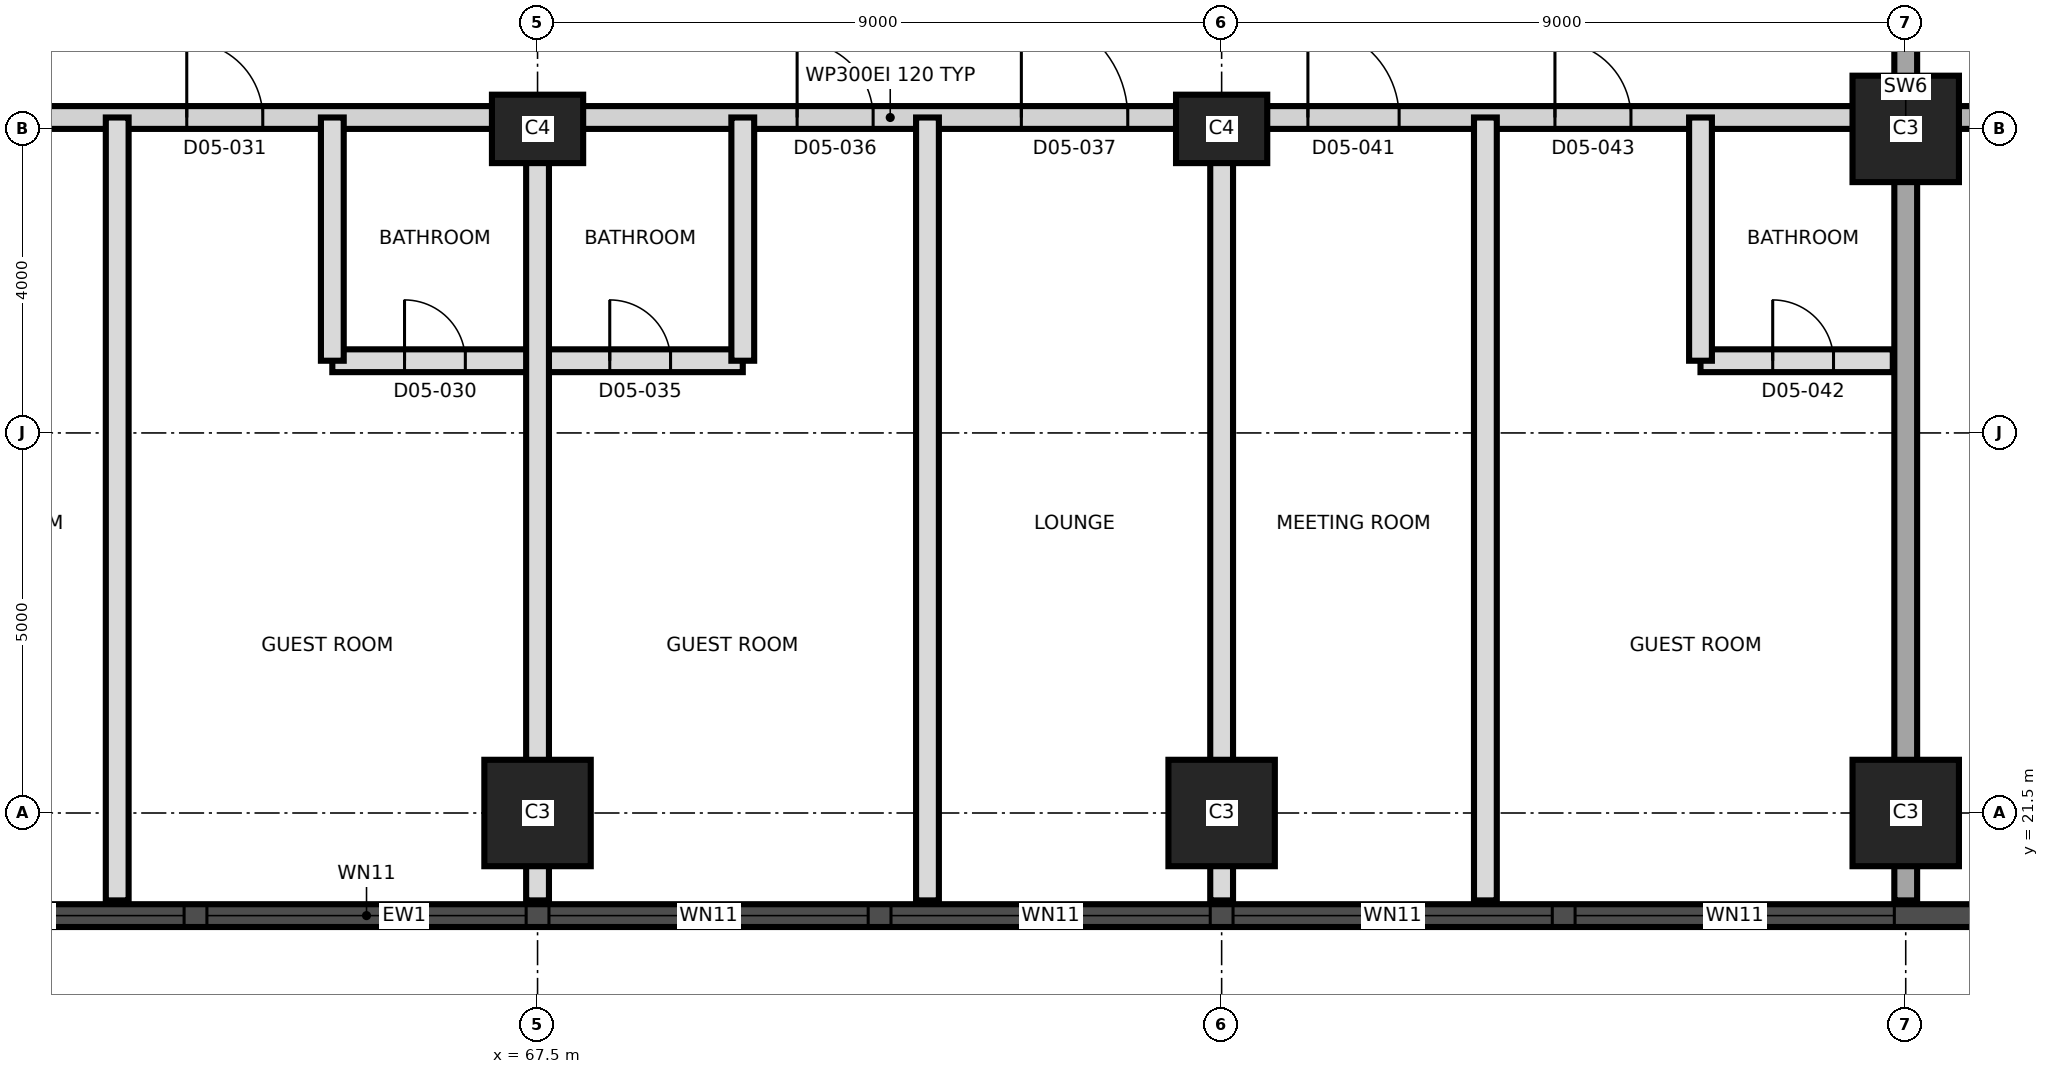
"""IFC4 building model, lengths in metres.
Left out: names, types, materials, properties, quantities, classifications, styles, units other than length and angle.
Written with IfcOpenShell. Run it as: python <this file> out.ifc"""

import sys

from ifc_helpers import new_model, si_unit, direction, frame, frame_2d, origin, origin_2d, place, context, subcontext, project, spatial, rectangle, extrude, element, fill, save


model = new_model("IFC4")
c1 = context("Model", 3, precision=1e-05, world=origin(), true_north=direction((0.0, 1.0)))
c2 = subcontext(c1, "Body", "Model", "MODEL_VIEW")
j1 = project(units=[si_unit("LENGTHUNIT", "METRE"), si_unit("PLANEANGLEUNIT", "RADIAN")], contexts=[c1])
p1 = place(None, origin())
s1 = spatial("IfcSite", under=j1, at=p1, CompositionType="ELEMENT")
p2 = place(p1, origin())
s2 = spatial("IfcBuilding", under=s1, at=p2, CompositionType="ELEMENT")
p3 = place(p2, frame((0.0, 0.0, 74.2)))
s3 = spatial("IfcBuildingStorey", under=s2, at=p3, CompositionType="ELEMENT", Elevation=74.2)
for number, where, z_axis, x_axis in (
    (1, (67.5, 21.5, 0.0), (0.0, 0.0, 1.0), (1.0, 0.0, 0.0)),
    (2, (76.5, 21.5, 0.0), (0.0, 0.0, 1.0), (1.0, 0.0, 0.0)),
    (3, (85.5, 21.5, 0.0), (0.0, 0.0, 1.0), (1.0, 0.0, 0.0)),
):
    element("IfcColumn", number, at=place(p3, frame(where, z_axis=z_axis, x_axis=x_axis)), inside=s3, PredefinedType="COLUMN", context=c2, shape_type="SweptSolid", body=[
        extrude(rectangle(XDim=1.4, YDim=1.4, at=origin_2d()), origin(), (0.0, 0.0, 1.0), 3.7),
    ])
for number, where, z_axis, x_axis in (
    (4, (67.5, 30.5, 0.0), (0.0, 0.0, 1.0), (1.0, 0.0, 0.0)),
    (5, (76.5, 30.5, 0.0), (0.0, 0.0, 1.0), (1.0, 0.0, 0.0)),
):
    element("IfcColumn", number, at=place(p3, frame(where, z_axis=z_axis, x_axis=x_axis)), inside=s3, PredefinedType="COLUMN", context=c2, shape_type="SweptSolid", body=[
        extrude(rectangle(XDim=1.2, YDim=0.9, at=origin_2d()), origin(), (0.0, 0.0, 1.0), 3.7),
    ])
p4 = place(p3, frame((85.5, 30.5, 0.0), z_axis=(0.0, 0.0, 1.0), x_axis=(1.0, 0.0, 0.0)))
e6 = element("IfcColumn", 6, at=p4, inside=s3, PredefinedType="COLUMN", context=c2, shape_type="SweptSolid", body=[
    extrude(rectangle(XDim=1.4, YDim=1.4, at=origin_2d()), origin(), (0.0, 0.0, 1.0), 3.7),
])
p5 = place(p3, frame((85.5, 20.35, 0.0), z_axis=(0.0, 0.0, 1.0), x_axis=(0.0, 1.0, 0.0)))
e7 = element("IfcWall", 7, at=p5, inside=s3, PredefinedType="SHEAR", context=c2, shape_type="SweptSolid", body=[
    extrude(rectangle(XDim=20.3, YDim=0.3, at=frame_2d((10.15, 0.0))), origin(), (0.0, 0.0, 1.0), 3.7),
])
p6 = place(p5, frame((11.35, 0.0, 0.0)))
e8 = element("IfcOpeningElement", 8, at=p6, cuts=e7, PredefinedType="OPENING", context=c2, shape_type="SweptSolid", body=[
    extrude(rectangle(XDim=1.4, YDim=2.1, at=frame_2d((0.7, 1.05))), frame((0.0, 0.16, 0.0), z_axis=(0.0, -1.0, 0.0), x_axis=(1.0, 0.0, 0.0)), (0.0, 0.0, 1.0), 0.32),
])
p7 = place(p3, frame((44.011, 20.15, 0.0), z_axis=(0.0, 0.0, 1.0), x_axis=(1.0, 0.0, 0.0)))
e9 = element("IfcWall", 9, at=p7, inside=s3, PredefinedType="SOLIDWALL", context=c2, shape_type="SweptSolid", body=[
    extrude(rectangle(XDim=43.476, YDim=0.3, at=frame_2d((21.738, 0.0))), origin(), (0.0, 0.0, 1.0), 3.4),
])
p8 = place(p7, frame((1.845, 0.0, 0.3)))
e10 = element("IfcOpeningElement", 10, at=p8, cuts=e9, PredefinedType="OPENING", context=c2, shape_type="SweptSolid", body=[
    extrude(rectangle(XDim=1.8, YDim=2.4, at=frame_2d((0.9, 1.2))), frame((0.0, 0.16, 0.0), z_axis=(0.0, -1.0, 0.0), x_axis=(1.0, 0.0, 0.0)), (0.0, 0.0, 1.0), 0.32),
])
p9 = place(p7, frame((5.639, 0.0, 0.9)))
e11 = element("IfcOpeningElement", 11, at=p9, cuts=e9, PredefinedType="OPENING", context=c2, shape_type="SweptSolid", body=[
    extrude(rectangle(XDim=4.2, YDim=1.5, at=frame_2d((2.1, 0.75))), frame((0.0, 0.16, 0.0), z_axis=(0.0, -1.0, 0.0), x_axis=(1.0, 0.0, 0.0)), (0.0, 0.0, 1.0), 0.32),
])
p10 = place(p7, frame((10.139, 0.0, 0.9)))
e12 = element("IfcOpeningElement", 12, at=p10, cuts=e9, PredefinedType="OPENING", context=c2, shape_type="SweptSolid", body=[
    extrude(rectangle(XDim=4.2, YDim=1.5, at=frame_2d((2.1, 0.75))), frame((0.0, 0.16, 0.0), z_axis=(0.0, -1.0, 0.0), x_axis=(1.0, 0.0, 0.0)), (0.0, 0.0, 1.0), 0.32),
])
p11 = place(p7, frame((14.639, 0.0, 0.9)))
e13 = element("IfcOpeningElement", 13, at=p11, cuts=e9, PredefinedType="OPENING", context=c2, shape_type="SweptSolid", body=[
    extrude(rectangle(XDim=4.2, YDim=1.5, at=frame_2d((2.1, 0.75))), frame((0.0, 0.16, 0.0), z_axis=(0.0, -1.0, 0.0), x_axis=(1.0, 0.0, 0.0)), (0.0, 0.0, 1.0), 0.32),
])
p12 = place(p7, frame((19.139, 0.0, 0.9)))
e14 = element("IfcOpeningElement", 14, at=p12, cuts=e9, PredefinedType="OPENING", context=c2, shape_type="SweptSolid", body=[
    extrude(rectangle(XDim=4.2, YDim=1.5, at=frame_2d((2.1, 0.75))), frame((0.0, 0.16, 0.0), z_axis=(0.0, -1.0, 0.0), x_axis=(1.0, 0.0, 0.0)), (0.0, 0.0, 1.0), 0.32),
])
p13 = place(p7, frame((23.639, 0.0, 0.9)))
e15 = element("IfcOpeningElement", 15, at=p13, cuts=e9, PredefinedType="OPENING", context=c2, shape_type="SweptSolid", body=[
    extrude(rectangle(XDim=4.2, YDim=1.5, at=frame_2d((2.1, 0.75))), frame((0.0, 0.16, 0.0), z_axis=(0.0, -1.0, 0.0), x_axis=(1.0, 0.0, 0.0)), (0.0, 0.0, 1.0), 0.32),
])
p14 = place(p7, frame((28.139, 0.0, 0.9)))
e16 = element("IfcOpeningElement", 16, at=p14, cuts=e9, PredefinedType="OPENING", context=c2, shape_type="SweptSolid", body=[
    extrude(rectangle(XDim=4.2, YDim=1.5, at=frame_2d((2.1, 0.75))), frame((0.0, 0.16, 0.0), z_axis=(0.0, -1.0, 0.0), x_axis=(1.0, 0.0, 0.0)), (0.0, 0.0, 1.0), 0.32),
])
p15 = place(p7, frame((32.639, 0.0, 0.9)))
e17 = element("IfcOpeningElement", 17, at=p15, cuts=e9, PredefinedType="OPENING", context=c2, shape_type="SweptSolid", body=[
    extrude(rectangle(XDim=4.2, YDim=1.5, at=frame_2d((2.1, 0.75))), frame((0.0, 0.16, 0.0), z_axis=(0.0, -1.0, 0.0), x_axis=(1.0, 0.0, 0.0)), (0.0, 0.0, 1.0), 0.32),
])
p16 = place(p7, frame((37.139, 0.0, 0.9)))
e18 = element("IfcOpeningElement", 18, at=p16, cuts=e9, PredefinedType="OPENING", context=c2, shape_type="SweptSolid", body=[
    extrude(rectangle(XDim=4.2, YDim=1.5, at=frame_2d((2.1, 0.75))), frame((0.0, 0.16, 0.0), z_axis=(0.0, -1.0, 0.0), x_axis=(1.0, 0.0, 0.0)), (0.0, 0.0, 1.0), 0.32),
])
p17 = place(p3, frame((64.8, 27.45, 0.0), z_axis=(0.0, 0.0, 1.0), x_axis=(1.0, 0.0, 0.0)))
e19 = element("IfcWall", 19, at=p17, inside=s3, PredefinedType="PARTITIONING", context=c2, shape_type="SweptSolid", body=[
    extrude(rectangle(XDim=5.4, YDim=0.3, at=frame_2d((2.7, 0.0))), origin(), (0.0, 0.0, 1.0), 3.4),
])
p18 = place(p17, frame((0.95, 0.0, 0.0)))
e20 = element("IfcOpeningElement", 20, at=p18, cuts=e19, PredefinedType="OPENING", context=c2, shape_type="SweptSolid", body=[
    extrude(rectangle(XDim=0.8, YDim=2.1, at=frame_2d((0.4, 1.05))), frame((0.0, 0.16, 0.0), z_axis=(0.0, -1.0, 0.0), x_axis=(1.0, 0.0, 0.0)), (0.0, 0.0, 1.0), 0.32),
])
p19 = place(p17, frame((3.65, 0.0, 0.0)))
e21 = element("IfcOpeningElement", 21, at=p19, cuts=e19, PredefinedType="OPENING", context=c2, shape_type="SweptSolid", body=[
    extrude(rectangle(XDim=0.8, YDim=2.1, at=frame_2d((0.4, 1.05))), frame((0.0, 0.16, 0.0), z_axis=(0.0, -1.0, 0.0), x_axis=(1.0, 0.0, 0.0)), (0.0, 0.0, 1.0), 0.32),
])
p20 = place(p3, frame((82.8, 27.45, 0.0), z_axis=(0.0, 0.0, 1.0), x_axis=(1.0, 0.0, 0.0)))
e22 = element("IfcWall", 22, at=p20, inside=s3, PredefinedType="PARTITIONING", context=c2, shape_type="SweptSolid", body=[
    extrude(rectangle(XDim=2.53, YDim=0.3, at=frame_2d((1.265, 0.0))), origin(), (0.0, 0.0, 1.0), 3.4),
])
p21 = place(p20, frame((0.95, 0.0, 0.0)))
e23 = element("IfcOpeningElement", 23, at=p21, cuts=e22, PredefinedType="OPENING", context=c2, shape_type="SweptSolid", body=[
    extrude(rectangle(XDim=0.8, YDim=2.1, at=frame_2d((0.4, 1.05))), frame((0.0, 0.16, 0.0), z_axis=(0.0, -1.0, 0.0), x_axis=(1.0, 0.0, 0.0)), (0.0, 0.0, 1.0), 0.32),
])
p22 = place(p3, frame((58.95, 30.65, 0.0), z_axis=(0.0, 0.0, 1.0), x_axis=(1.0, 0.0, 0.0)))
e24 = element("IfcWall", 24, at=p22, inside=s3, PredefinedType="PARTITIONING", context=c2, shape_type="SweptSolid", body=[
    extrude(rectangle(XDim=26.38, YDim=0.3, at=frame_2d((13.19, 0.0))), origin(), (0.0, 0.0, 1.0), 3.4),
])
p23 = place(p22, frame((0.685, 0.0, 0.0)))
e25 = element("IfcOpeningElement", 25, at=p23, cuts=e24, PredefinedType="OPENING", context=c2, shape_type="SweptSolid", body=[
    extrude(rectangle(XDim=1.2, YDim=2.1, at=frame_2d((0.6, 1.05))), frame((0.0, 0.16, 0.0), z_axis=(0.0, -1.0, 0.0), x_axis=(1.0, 0.0, 0.0)), (0.0, 0.0, 1.0), 0.32),
])
p24 = place(p22, frame((3.935, 0.0, 0.0)))
e26 = element("IfcOpeningElement", 26, at=p24, cuts=e24, PredefinedType="OPENING", context=c2, shape_type="SweptSolid", body=[
    extrude(rectangle(XDim=1.0, YDim=2.1, at=frame_2d((0.5, 1.05))), frame((0.0, 0.16, 0.0), z_axis=(0.0, -1.0, 0.0), x_axis=(1.0, 0.0, 0.0)), (0.0, 0.0, 1.0), 0.32),
])
p25 = place(p22, frame((11.965, 0.0, 0.0)))
e27 = element("IfcOpeningElement", 27, at=p25, cuts=e24, PredefinedType="OPENING", context=c2, shape_type="SweptSolid", body=[
    extrude(rectangle(XDim=1.0, YDim=2.1, at=frame_2d((0.5, 1.05))), frame((0.0, 0.16, 0.0), z_axis=(0.0, -1.0, 0.0), x_axis=(1.0, 0.0, 0.0)), (0.0, 0.0, 1.0), 0.32),
])
p26 = place(p22, frame((14.915, 0.0, 0.0)))
e28 = element("IfcOpeningElement", 28, at=p26, cuts=e24, PredefinedType="OPENING", context=c2, shape_type="SweptSolid", body=[
    extrude(rectangle(XDim=1.4, YDim=2.1, at=frame_2d((0.7, 1.05))), frame((0.0, 0.16, 0.0), z_axis=(0.0, -1.0, 0.0), x_axis=(1.0, 0.0, 0.0)), (0.0, 0.0, 1.0), 0.32),
])
p27 = place(p22, frame((18.685, 0.0, 0.0)))
e29 = element("IfcOpeningElement", 29, at=p27, cuts=e24, PredefinedType="OPENING", context=c2, shape_type="SweptSolid", body=[
    extrude(rectangle(XDim=1.2, YDim=2.1, at=frame_2d((0.6, 1.05))), frame((0.0, 0.16, 0.0), z_axis=(0.0, -1.0, 0.0), x_axis=(1.0, 0.0, 0.0)), (0.0, 0.0, 1.0), 0.32),
])
p28 = place(p22, frame((21.935, 0.0, 0.0)))
e30 = element("IfcOpeningElement", 30, at=p28, cuts=e24, PredefinedType="OPENING", context=c2, shape_type="SweptSolid", body=[
    extrude(rectangle(XDim=1.0, YDim=2.1, at=frame_2d((0.5, 1.05))), frame((0.0, 0.16, 0.0), z_axis=(0.0, -1.0, 0.0), x_axis=(1.0, 0.0, 0.0)), (0.0, 0.0, 1.0), 0.32),
])
p29 = place(p3, frame((85.67, 30.65, 0.0), z_axis=(0.0, 0.0, 1.0), x_axis=(1.0, 0.0, 0.0)))
e31 = element("IfcWall", 31, at=p29, inside=s3, PredefinedType="SHEAR", context=c2, shape_type="SweptSolid", body=[
    extrude(rectangle(XDim=9.58, YDim=0.3, at=frame_2d((4.79, 0.0))), origin(), (0.0, 0.0, 1.0), 3.4),
])
p30 = place(p29, frame((2.08, 0.0, 0.0)))
e32 = element("IfcOpeningElement", 32, at=p30, cuts=e31, PredefinedType="OPENING", context=c2, shape_type="SweptSolid", body=[
    extrude(rectangle(XDim=1.2, YDim=2.1, at=frame_2d((0.6, 1.05))), frame((0.0, 0.16, 0.0), z_axis=(0.0, -1.0, 0.0), x_axis=(1.0, 0.0, 0.0)), (0.0, 0.0, 1.0), 0.32),
])
p31 = place(p29, frame((5.63, 0.0, 0.0)))
e33 = element("IfcOpeningElement", 33, at=p31, cuts=e31, PredefinedType="OPENING", context=c2, shape_type="SweptSolid", body=[
    extrude(rectangle(XDim=1.0, YDim=2.1, at=frame_2d((0.5, 1.05))), frame((0.0, 0.16, 0.0), z_axis=(0.0, -1.0, 0.0), x_axis=(1.0, 0.0, 0.0)), (0.0, 0.0, 1.0), 0.32),
])
p32 = place(p3, frame((61.97, 20.35, 0.0), z_axis=(0.0, 0.0, 1.0), x_axis=(0.0, 1.0, 0.0)))
e34 = element("IfcWall", 34, at=p32, inside=s3, PredefinedType="PARTITIONING", context=c2, shape_type="SweptSolid", body=[
    extrude(rectangle(XDim=10.3, YDim=0.3, at=frame_2d((5.15, 0.0))), origin(), (0.0, 0.0, 1.0), 3.4),
])
p33 = place(p3, frame((64.8, 27.45, 0.0), z_axis=(0.0, 0.0, 1.0), x_axis=(0.0, 1.0, 0.0)))
e35 = element("IfcWall", 35, at=p33, inside=s3, PredefinedType="PARTITIONING", context=c2, shape_type="SweptSolid", body=[
    extrude(rectangle(XDim=3.2, YDim=0.3, at=frame_2d((1.6, 0.0))), origin(), (0.0, 0.0, 1.0), 3.4),
])
p34 = place(p3, frame((67.5, 20.35, 0.0), z_axis=(0.0, 0.0, 1.0), x_axis=(0.0, 1.0, 0.0)))
e36 = element("IfcWall", 36, at=p34, inside=s3, PredefinedType="PARTITIONING", context=c2, shape_type="SweptSolid", body=[
    extrude(rectangle(XDim=10.3, YDim=0.3, at=frame_2d((5.15, 0.0))), origin(), (0.0, 0.0, 1.0), 3.4),
])
p35 = place(p3, frame((70.2, 27.45, 0.0), z_axis=(0.0, 0.0, 1.0), x_axis=(0.0, 1.0, 0.0)))
e37 = element("IfcWall", 37, at=p35, inside=s3, PredefinedType="PARTITIONING", context=c2, shape_type="SweptSolid", body=[
    extrude(rectangle(XDim=3.2, YDim=0.3, at=frame_2d((1.6, 0.0))), origin(), (0.0, 0.0, 1.0), 3.4),
])
for number, where, z_axis, x_axis in (
    (38, (72.63, 20.35, 0.0), (0.0, 0.0, 1.0), (0.0, 1.0, 0.0)),
    (39, (76.5, 20.35, 0.0), (0.0, 0.0, 1.0), (0.0, 1.0, 0.0)),
    (40, (79.97, 20.35, 0.0), (0.0, 0.0, 1.0), (0.0, 1.0, 0.0)),
):
    element("IfcWall", number, at=place(p3, frame(where, z_axis=z_axis, x_axis=x_axis)), inside=s3, PredefinedType="PARTITIONING", context=c2, shape_type="SweptSolid", body=[
        extrude(rectangle(XDim=10.3, YDim=0.3, at=frame_2d((5.15, 0.0))), origin(), (0.0, 0.0, 1.0), 3.4),
    ])
p36 = place(p3, frame((82.8, 27.45, 0.0), z_axis=(0.0, 0.0, 1.0), x_axis=(0.0, 1.0, 0.0)))
e41 = element("IfcWall", 41, at=p36, inside=s3, PredefinedType="PARTITIONING", context=c2, shape_type="SweptSolid", body=[
    extrude(rectangle(XDim=3.2, YDim=0.3, at=frame_2d((1.6, 0.0))), origin(), (0.0, 0.0, 1.0), 3.4),
])
p37 = place(p11, origin())
e42 = element("IfcWindow", 42, at=p37, inside=s3, PartitioningType="SINGLE_PANEL", PredefinedType="WINDOW", context=c2, shape_type="SweptSolid", body=[
    extrude(rectangle(XDim=4.2, YDim=1.5, at=frame_2d((2.1, 0.75))), frame((0.0, 0.03, 0.0), z_axis=(0.0, -1.0, 0.0), x_axis=(1.0, 0.0, 0.0)), (0.0, 0.0, 1.0), 0.06),
])
fill(e13, e42)
p38 = place(p12, origin())
e43 = element("IfcWindow", 43, at=p38, inside=s3, PartitioningType="SINGLE_PANEL", PredefinedType="WINDOW", context=c2, shape_type="SweptSolid", body=[
    extrude(rectangle(XDim=4.2, YDim=1.5, at=frame_2d((2.1, 0.75))), frame((0.0, 0.03, 0.0), z_axis=(0.0, -1.0, 0.0), x_axis=(1.0, 0.0, 0.0)), (0.0, 0.0, 1.0), 0.06),
])
fill(e14, e43)
p39 = place(p13, origin())
e44 = element("IfcWindow", 44, at=p39, inside=s3, PartitioningType="SINGLE_PANEL", PredefinedType="WINDOW", context=c2, shape_type="SweptSolid", body=[
    extrude(rectangle(XDim=4.2, YDim=1.5, at=frame_2d((2.1, 0.75))), frame((0.0, 0.03, 0.0), z_axis=(0.0, -1.0, 0.0), x_axis=(1.0, 0.0, 0.0)), (0.0, 0.0, 1.0), 0.06),
])
fill(e15, e44)
p40 = place(p14, origin())
e45 = element("IfcWindow", 45, at=p40, inside=s3, PartitioningType="SINGLE_PANEL", PredefinedType="WINDOW", context=c2, shape_type="SweptSolid", body=[
    extrude(rectangle(XDim=4.2, YDim=1.5, at=frame_2d((2.1, 0.75))), frame((0.0, 0.03, 0.0), z_axis=(0.0, -1.0, 0.0), x_axis=(1.0, 0.0, 0.0)), (0.0, 0.0, 1.0), 0.06),
])
fill(e16, e45)
p41 = place(p15, origin())
e46 = element("IfcWindow", 46, at=p41, inside=s3, PartitioningType="SINGLE_PANEL", PredefinedType="WINDOW", context=c2, shape_type="SweptSolid", body=[
    extrude(rectangle(XDim=4.2, YDim=1.5, at=frame_2d((2.1, 0.75))), frame((0.0, 0.03, 0.0), z_axis=(0.0, -1.0, 0.0), x_axis=(1.0, 0.0, 0.0)), (0.0, 0.0, 1.0), 0.06),
])
fill(e17, e46)
p42 = place(p16, origin())
e47 = element("IfcWindow", 47, at=p42, inside=s3, PartitioningType="SINGLE_PANEL", PredefinedType="WINDOW", context=c2, shape_type="SweptSolid", body=[
    extrude(rectangle(XDim=4.2, YDim=1.5, at=frame_2d((2.1, 0.75))), frame((0.0, 0.03, 0.0), z_axis=(0.0, -1.0, 0.0), x_axis=(1.0, 0.0, 0.0)), (0.0, 0.0, 1.0), 0.06),
])
fill(e18, e47)
p43 = place(p18, origin())
e48 = element("IfcDoor", 48, at=p43, inside=s3, OperationType="SINGLE_SWING_RIGHT", PredefinedType="DOOR", context=c2, shape_type="SweptSolid", body=[
    extrude(rectangle(XDim=0.8, YDim=2.1, at=frame_2d((0.4, 1.05))), frame((0.0, 0.025, 0.0), z_axis=(0.0, -1.0, 0.0), x_axis=(1.0, 0.0, 0.0)), (0.0, 0.0, 1.0), 0.05),
])
fill(e20, e48)
p44 = place(p24, origin())
e49 = element("IfcDoor", 49, at=p44, inside=s3, OperationType="SINGLE_SWING_LEFT", PredefinedType="DOOR", context=c2, shape_type="SweptSolid", body=[
    extrude(rectangle(XDim=1.0, YDim=2.1, at=frame_2d((0.5, 1.05))), frame((0.0, 0.025, 0.0), z_axis=(0.0, -1.0, 0.0), x_axis=(1.0, 0.0, 0.0)), (0.0, 0.0, 1.0), 0.05),
])
fill(e26, e49)
p45 = place(p19, origin())
e50 = element("IfcDoor", 50, at=p45, inside=s3, OperationType="SINGLE_SWING_LEFT", PredefinedType="DOOR", context=c2, shape_type="SweptSolid", body=[
    extrude(rectangle(XDim=0.8, YDim=2.1, at=frame_2d((0.4, 1.05))), frame((0.0, 0.025, 0.0), z_axis=(0.0, -1.0, 0.0), x_axis=(1.0, 0.0, 0.0)), (0.0, 0.0, 1.0), 0.05),
])
fill(e21, e50)
p46 = place(p25, origin())
e51 = element("IfcDoor", 51, at=p46, inside=s3, OperationType="SINGLE_SWING_LEFT", PredefinedType="DOOR", context=c2, shape_type="SweptSolid", body=[
    extrude(rectangle(XDim=1.0, YDim=2.1, at=frame_2d((0.5, 1.05))), frame((0.0, 0.025, 0.0), z_axis=(0.0, -1.0, 0.0), x_axis=(1.0, 0.0, 0.0)), (0.0, 0.0, 1.0), 0.05),
])
fill(e27, e51)
p47 = place(p26, origin())
e52 = element("IfcDoor", 52, at=p47, inside=s3, OperationType="SINGLE_SWING_RIGHT", PredefinedType="DOOR", context=c2, shape_type="SweptSolid", body=[
    extrude(rectangle(XDim=1.4, YDim=2.1, at=frame_2d((0.7, 1.05))), frame((0.0, 0.025, 0.0), z_axis=(0.0, -1.0, 0.0), x_axis=(1.0, 0.0, 0.0)), (0.0, 0.0, 1.0), 0.05),
])
fill(e28, e52)
p48 = place(p27, origin())
e53 = element("IfcDoor", 53, at=p48, inside=s3, OperationType="SINGLE_SWING_LEFT", PredefinedType="DOOR", context=c2, shape_type="SweptSolid", body=[
    extrude(rectangle(XDim=1.2, YDim=2.1, at=frame_2d((0.6, 1.05))), frame((0.0, 0.025, 0.0), z_axis=(0.0, -1.0, 0.0), x_axis=(1.0, 0.0, 0.0)), (0.0, 0.0, 1.0), 0.05),
])
fill(e29, e53)
p49 = place(p21, origin())
e54 = element("IfcDoor", 54, at=p49, inside=s3, OperationType="SINGLE_SWING_RIGHT", PredefinedType="DOOR", context=c2, shape_type="SweptSolid", body=[
    extrude(rectangle(XDim=0.8, YDim=2.1, at=frame_2d((0.4, 1.05))), frame((0.0, 0.025, 0.0), z_axis=(0.0, -1.0, 0.0), x_axis=(1.0, 0.0, 0.0)), (0.0, 0.0, 1.0), 0.05),
])
fill(e23, e54)
p50 = place(p28, origin())
e55 = element("IfcDoor", 55, at=p50, inside=s3, OperationType="SINGLE_SWING_LEFT", PredefinedType="DOOR", context=c2, shape_type="SweptSolid", body=[
    extrude(rectangle(XDim=1.0, YDim=2.1, at=frame_2d((0.5, 1.05))), frame((0.0, 0.025, 0.0), z_axis=(0.0, -1.0, 0.0), x_axis=(1.0, 0.0, 0.0)), (0.0, 0.0, 1.0), 0.05),
])
fill(e30, e55)
save(model, sys.argv[1])
